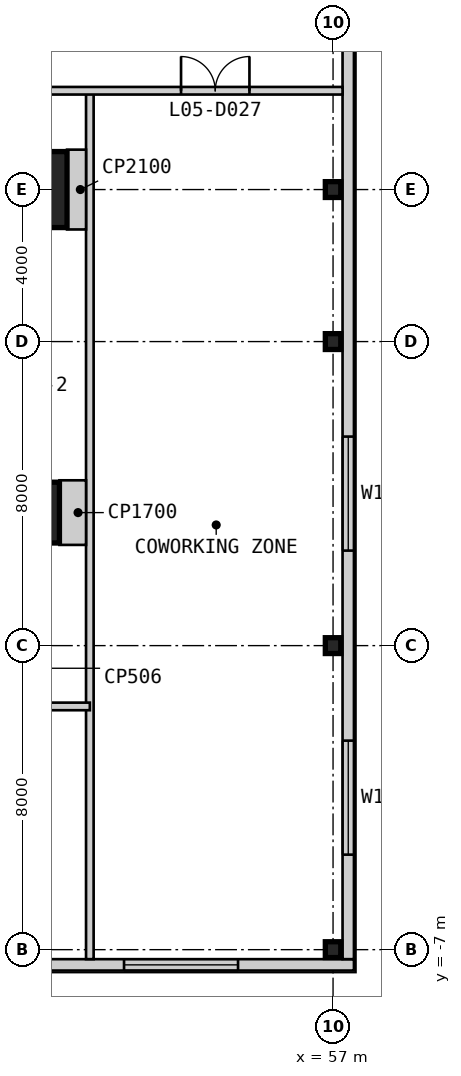
"""IFC4 building model, lengths in metres.
Left out: names, types, materials, properties, quantities, classifications, styles, units other than length and angle.
Written with IfcOpenShell. Run it as: python <this file> out.ifc"""

import sys

from ifc_helpers import new_model, si_unit, direction, frame, frame_2d, origin, origin_2d, place, context, subcontext, project, spatial, rectangle, i_section, extrude, element, fill, save


model = new_model("IFC4")
c1 = context("Model", 3, precision=1e-05, world=origin(), true_north=direction((0.0, 1.0)))
c2 = subcontext(c1, "Body", "Model", "MODEL_VIEW")
j1 = project(units=[si_unit("LENGTHUNIT", "METRE"), si_unit("PLANEANGLEUNIT", "RADIAN")], contexts=[c1])
p1 = place(None, origin())
s1 = spatial("IfcSite", under=j1, at=p1, CompositionType="ELEMENT")
p2 = place(p1, origin())
s2 = spatial("IfcBuilding", under=s1, at=p2, CompositionType="ELEMENT")
p3 = place(p2, frame((0.0, 0.0, 26.2)))
s3 = spatial("IfcBuildingStorey", under=s2, at=p3, CompositionType="ELEMENT", Elevation=26.2)
p4 = place(p3, frame((49.0, 4.5, 0.0), z_axis=(0.0, 0.0, 1.0), x_axis=(1.0, 0.0, 0.0)))
e1 = element("IfcColumn", 1, at=p4, inside=s3, PredefinedType="COLUMN", context=c2, shape_type="SweptSolid", body=[
    extrude(rectangle(XDim=1.6, YDim=1.6, at=origin_2d()), origin(), (0.0, 0.0, 1.0), 4.8),
])
p5 = place(p3, frame((49.0, 13.0, 0.0), z_axis=(0.0, 0.0, 1.0), x_axis=(1.0, 0.0, 0.0)))
e2 = element("IfcColumn", 2, at=p5, inside=s3, PredefinedType="COLUMN", context=c2, shape_type="SweptSolid", body=[
    extrude(rectangle(XDim=2.0, YDim=2.0, at=origin_2d()), origin(), (0.0, 0.0, 1.0), 4.8),
])
for number, where, z_axis, x_axis in (
    (3, (57.0, -7.0, 0.0), (0.0, 0.0, 1.0), (1.0, 0.0, 0.0)),
    (4, (57.0, 1.0, 0.0), (0.0, 0.0, 1.0), (1.0, 0.0, 0.0)),
    (5, (57.0, 9.0, 0.0), (0.0, 0.0, 1.0), (1.0, 0.0, 0.0)),
    (6, (57.0, 13.0, 0.0), (0.0, 0.0, 1.0), (1.0, 0.0, 0.0)),
):
    element("IfcColumn", number, at=place(p3, frame(where, z_axis=z_axis, x_axis=x_axis)), inside=s3, PredefinedType="COLUMN", context=c2, shape_type="SweptSolid", body=[
        extrude(i_section(OverallWidth=0.406, OverallDepth=0.417, WebThickness=0.03, FlangeThickness=0.048, at=origin_2d()), origin(), (0.0, 0.0, 1.0), 4.8),
    ])
p6 = place(p3, frame((-7.55, -7.4, 0.0), z_axis=(0.0, 0.0, 1.0), x_axis=(1.0, 0.0, 0.0)))
e7 = element("IfcWall", 7, at=p6, inside=s3, PredefinedType="SOLIDWALL", context=c2, shape_type="SweptSolid", body=[
    extrude(rectangle(XDim=65.1, YDim=0.3, at=frame_2d((32.55, 0.0))), origin(), (0.0, 0.0, 1.0), 4.5),
])
p7 = place(p6, frame((3.05, 0.0, 0.9)))
e8 = element("IfcOpeningElement", 8, at=p7, cuts=e7, PredefinedType="OPENING", context=c2, shape_type="SweptSolid", body=[
    extrude(rectangle(XDim=3.0, YDim=2.4, at=frame_2d((1.5, 1.2))), frame((0.0, 0.16, 0.0), z_axis=(0.0, -1.0, 0.0), x_axis=(1.0, 0.0, 0.0)), (0.0, 0.0, 1.0), 0.32),
])
p8 = place(p6, frame((11.05, 0.0, 0.9)))
e9 = element("IfcOpeningElement", 9, at=p8, cuts=e7, PredefinedType="OPENING", context=c2, shape_type="SweptSolid", body=[
    extrude(rectangle(XDim=3.0, YDim=2.4, at=frame_2d((1.5, 1.2))), frame((0.0, 0.16, 0.0), z_axis=(0.0, -1.0, 0.0), x_axis=(1.0, 0.0, 0.0)), (0.0, 0.0, 1.0), 0.32),
])
p9 = place(p6, frame((25.05, 0.0, 0.9)))
e10 = element("IfcOpeningElement", 10, at=p9, cuts=e7, PredefinedType="OPENING", context=c2, shape_type="SweptSolid", body=[
    extrude(rectangle(XDim=3.0, YDim=2.4, at=frame_2d((1.5, 1.2))), frame((0.0, 0.16, 0.0), z_axis=(0.0, -1.0, 0.0), x_axis=(1.0, 0.0, 0.0)), (0.0, 0.0, 1.0), 0.32),
])
p10 = place(p6, frame((37.05, 0.0, 0.9)))
e11 = element("IfcOpeningElement", 11, at=p10, cuts=e7, PredefinedType="OPENING", context=c2, shape_type="SweptSolid", body=[
    extrude(rectangle(XDim=3.0, YDim=2.4, at=frame_2d((1.5, 1.2))), frame((0.0, 0.16, 0.0), z_axis=(0.0, -1.0, 0.0), x_axis=(1.0, 0.0, 0.0)), (0.0, 0.0, 1.0), 0.32),
])
p11 = place(p6, frame((45.55, 0.0, 0.9)))
e12 = element("IfcOpeningElement", 12, at=p11, cuts=e7, PredefinedType="OPENING", context=c2, shape_type="SweptSolid", body=[
    extrude(rectangle(XDim=3.0, YDim=2.4, at=frame_2d((1.5, 1.2))), frame((0.0, 0.16, 0.0), z_axis=(0.0, -1.0, 0.0), x_axis=(1.0, 0.0, 0.0)), (0.0, 0.0, 1.0), 0.32),
])
p12 = place(p6, frame((51.55, 0.0, 0.9)))
e13 = element("IfcOpeningElement", 13, at=p12, cuts=e7, PredefinedType="OPENING", context=c2, shape_type="SweptSolid", body=[
    extrude(rectangle(XDim=3.0, YDim=2.4, at=frame_2d((1.5, 1.2))), frame((0.0, 0.16, 0.0), z_axis=(0.0, -1.0, 0.0), x_axis=(1.0, 0.0, 0.0)), (0.0, 0.0, 1.0), 0.32),
])
p13 = place(p6, frame((59.05, 0.0, 0.9)))
e14 = element("IfcOpeningElement", 14, at=p13, cuts=e7, PredefinedType="OPENING", context=c2, shape_type="SweptSolid", body=[
    extrude(rectangle(XDim=3.0, YDim=2.4, at=frame_2d((1.5, 1.2))), frame((0.0, 0.16, 0.0), z_axis=(0.0, -1.0, 0.0), x_axis=(1.0, 0.0, 0.0)), (0.0, 0.0, 1.0), 0.32),
])
p14 = place(p3, frame((57.4, -7.25, 0.0), z_axis=(0.0, 0.0, 1.0), x_axis=(0.0, 1.0, 0.0)))
e15 = element("IfcWall", 15, at=p14, inside=s3, PredefinedType="SOLIDWALL", context=c2, shape_type="SweptSolid", body=[
    extrude(rectangle(XDim=72.5, YDim=0.3, at=frame_2d((36.25, 0.0))), origin(), (0.0, 0.0, 1.0), 4.5),
])
p15 = place(p14, frame((2.75, 0.0, 0.9)))
e16 = element("IfcOpeningElement", 16, at=p15, cuts=e15, PredefinedType="OPENING", context=c2, shape_type="SweptSolid", body=[
    extrude(rectangle(XDim=3.0, YDim=2.4, at=frame_2d((1.5, 1.2))), frame((0.0, 0.16, 0.0), z_axis=(0.0, -1.0, 0.0), x_axis=(1.0, 0.0, 0.0)), (0.0, 0.0, 1.0), 0.32),
])
p16 = place(p14, frame((10.75, 0.0, 0.9)))
e17 = element("IfcOpeningElement", 17, at=p16, cuts=e15, PredefinedType="OPENING", context=c2, shape_type="SweptSolid", body=[
    extrude(rectangle(XDim=3.0, YDim=2.4, at=frame_2d((1.5, 1.2))), frame((0.0, 0.16, 0.0), z_axis=(0.0, -1.0, 0.0), x_axis=(1.0, 0.0, 0.0)), (0.0, 0.0, 1.0), 0.32),
])
p17 = place(p14, frame((24.75, 0.0, 0.9)))
e18 = element("IfcOpeningElement", 18, at=p17, cuts=e15, PredefinedType="OPENING", context=c2, shape_type="SweptSolid", body=[
    extrude(rectangle(XDim=3.0, YDim=2.4, at=frame_2d((1.5, 1.2))), frame((0.0, 0.16, 0.0), z_axis=(0.0, -1.0, 0.0), x_axis=(1.0, 0.0, 0.0)), (0.0, 0.0, 1.0), 0.32),
])
p18 = place(p14, frame((36.75, 0.0, 0.9)))
e19 = element("IfcOpeningElement", 19, at=p18, cuts=e15, PredefinedType="OPENING", context=c2, shape_type="SweptSolid", body=[
    extrude(rectangle(XDim=3.0, YDim=2.4, at=frame_2d((1.5, 1.2))), frame((0.0, 0.16, 0.0), z_axis=(0.0, -1.0, 0.0), x_axis=(1.0, 0.0, 0.0)), (0.0, 0.0, 1.0), 0.32),
])
p19 = place(p14, frame((45.25, 0.0, 0.9)))
e20 = element("IfcOpeningElement", 20, at=p19, cuts=e15, PredefinedType="OPENING", context=c2, shape_type="SweptSolid", body=[
    extrude(rectangle(XDim=3.0, YDim=2.4, at=frame_2d((1.5, 1.2))), frame((0.0, 0.16, 0.0), z_axis=(0.0, -1.0, 0.0), x_axis=(1.0, 0.0, 0.0)), (0.0, 0.0, 1.0), 0.32),
])
p20 = place(p14, frame((51.25, 0.0, 0.9)))
e21 = element("IfcOpeningElement", 21, at=p20, cuts=e15, PredefinedType="OPENING", context=c2, shape_type="SweptSolid", body=[
    extrude(rectangle(XDim=3.0, YDim=2.4, at=frame_2d((1.5, 1.2))), frame((0.0, 0.16, 0.0), z_axis=(0.0, -1.0, 0.0), x_axis=(1.0, 0.0, 0.0)), (0.0, 0.0, 1.0), 0.32),
])
p21 = place(p14, frame((58.75, 0.0, 0.9)))
e22 = element("IfcOpeningElement", 22, at=p21, cuts=e15, PredefinedType="OPENING", context=c2, shape_type="SweptSolid", body=[
    extrude(rectangle(XDim=3.0, YDim=2.4, at=frame_2d((1.5, 1.2))), frame((0.0, 0.16, 0.0), z_axis=(0.0, -1.0, 0.0), x_axis=(1.0, 0.0, 0.0)), (0.0, 0.0, 1.0), 0.32),
])
p22 = place(p14, frame((66.75, 0.0, 0.9)))
e23 = element("IfcOpeningElement", 23, at=p22, cuts=e15, PredefinedType="OPENING", context=c2, shape_type="SweptSolid", body=[
    extrude(rectangle(XDim=3.0, YDim=2.4, at=frame_2d((1.5, 1.2))), frame((0.0, 0.16, 0.0), z_axis=(0.0, -1.0, 0.0), x_axis=(1.0, 0.0, 0.0)), (0.0, 0.0, 1.0), 0.32),
])
p23 = place(p3, frame((50.6, -7.25, 0.0), z_axis=(0.0, 0.0, 1.0), x_axis=(0.0, 1.0, 0.0)))
e24 = element("IfcWall", 24, at=p23, inside=s3, PredefinedType="PARTITIONING", context=c2, shape_type="SweptSolid", body=[
    extrude(rectangle(XDim=22.85, YDim=0.2, at=frame_2d((11.425, 0.0))), origin(), (0.0, 0.0, 1.0), 4.5),
])
p24 = place(p3, frame((34.4, -0.6, 0.0), z_axis=(0.0, 0.0, 1.0), x_axis=(1.0, 0.0, 0.0)))
e25 = element("IfcWall", 25, at=p24, inside=s3, PredefinedType="PARTITIONING", context=c2, shape_type="SweptSolid", body=[
    extrude(rectangle(XDim=16.2, YDim=0.2, at=frame_2d((8.1, 0.0))), origin(), (0.0, 0.0, 1.0), 4.5),
])
p25 = place(p3, frame((43.0, 15.6, 0.0), z_axis=(0.0, 0.0, 1.0), x_axis=(1.0, 0.0, 0.0)))
e26 = element("IfcWall", 26, at=p25, inside=s3, PredefinedType="PARTITIONING", context=c2, shape_type="SweptSolid", body=[
    extrude(rectangle(XDim=14.25, YDim=0.2, at=frame_2d((7.125, 0.0))), origin(), (0.0, 0.0, 1.0), 4.5),
])
p26 = place(p25, frame((10.0, 0.0, 0.0)))
e27 = element("IfcOpeningElement", 27, at=p26, cuts=e26, PredefinedType="OPENING", context=c2, shape_type="SweptSolid", body=[
    extrude(rectangle(XDim=1.8, YDim=2.4, at=frame_2d((0.9, 1.2))), frame((0.0, 0.11, 0.0), z_axis=(0.0, -1.0, 0.0), x_axis=(1.0, 0.0, 0.0)), (0.0, 0.0, 1.0), 0.22),
])
p27 = place(p25, frame((2.925, 0.0, 0.0)))
e28 = element("IfcOpeningElement", 28, at=p27, cuts=e26, PredefinedType="OPENING", context=c2, shape_type="SweptSolid", body=[
    extrude(rectangle(XDim=1.8, YDim=2.4, at=frame_2d((0.9, 1.2))), frame((0.0, 0.11, 0.0), z_axis=(0.0, -1.0, 0.0), x_axis=(1.0, 0.0, 0.0)), (0.0, 0.0, 1.0), 0.22),
])
p28 = place(p3, frame((50.5, 4.5, 0.0), z_axis=(0.0, 0.0, 1.0), x_axis=(-1.0, 0.0, 0.0)))
e29 = element("IfcWall", 29, at=p28, inside=s3, PredefinedType="PARTITIONING", context=c2, shape_type="SweptSolid", body=[
    extrude(rectangle(XDim=0.7, YDim=1.7, at=frame_2d((0.35, 0.0))), origin(), (0.0, 0.0, 1.0), 4.5),
])
p29 = place(p3, frame((50.5, 13.0, 0.0), z_axis=(0.0, 0.0, 1.0), x_axis=(-1.0, 0.0, 0.0)))
e30 = element("IfcWall", 30, at=p29, inside=s3, PredefinedType="PARTITIONING", context=c2, shape_type="SweptSolid", body=[
    extrude(rectangle(XDim=0.5, YDim=2.1, at=frame_2d((0.25, 0.0))), origin(), (0.0, 0.0, 1.0), 4.5),
])
p30 = place(p13, origin())
e31 = element("IfcWindow", 31, at=p30, inside=s3, PartitioningType="SINGLE_PANEL", PredefinedType="WINDOW", context=c2, shape_type="SweptSolid", body=[
    extrude(rectangle(XDim=3.0, YDim=2.4, at=frame_2d((1.5, 1.2))), frame((0.0, 0.03, 0.0), z_axis=(0.0, -1.0, 0.0), x_axis=(1.0, 0.0, 0.0)), (0.0, 0.0, 1.0), 0.06),
])
fill(e14, e31)
p31 = place(p15, origin())
e32 = element("IfcWindow", 32, at=p31, inside=s3, PartitioningType="SINGLE_PANEL", PredefinedType="WINDOW", context=c2, shape_type="SweptSolid", body=[
    extrude(rectangle(XDim=3.0, YDim=2.4, at=frame_2d((1.5, 1.2))), frame((0.0, 0.03, 0.0), z_axis=(0.0, -1.0, 0.0), x_axis=(1.0, 0.0, 0.0)), (0.0, 0.0, 1.0), 0.06),
])
fill(e16, e32)
p32 = place(p16, origin())
e33 = element("IfcWindow", 33, at=p32, inside=s3, PartitioningType="SINGLE_PANEL", PredefinedType="WINDOW", context=c2, shape_type="SweptSolid", body=[
    extrude(rectangle(XDim=3.0, YDim=2.4, at=frame_2d((1.5, 1.2))), frame((0.0, 0.03, 0.0), z_axis=(0.0, -1.0, 0.0), x_axis=(1.0, 0.0, 0.0)), (0.0, 0.0, 1.0), 0.06),
])
fill(e17, e33)
p33 = place(p26, origin())
e34 = element("IfcDoor", 34, at=p33, inside=s3, OperationType="DOUBLE_DOOR_SINGLE_SWING", PredefinedType="DOOR", context=c2, shape_type="SweptSolid", body=[
    extrude(rectangle(XDim=1.8, YDim=2.4, at=frame_2d((0.9, 1.2))), frame((0.0, 0.025, 0.0), z_axis=(0.0, -1.0, 0.0), x_axis=(1.0, 0.0, 0.0)), (0.0, 0.0, 1.0), 0.05),
])
fill(e27, e34)
save(model, sys.argv[1])
